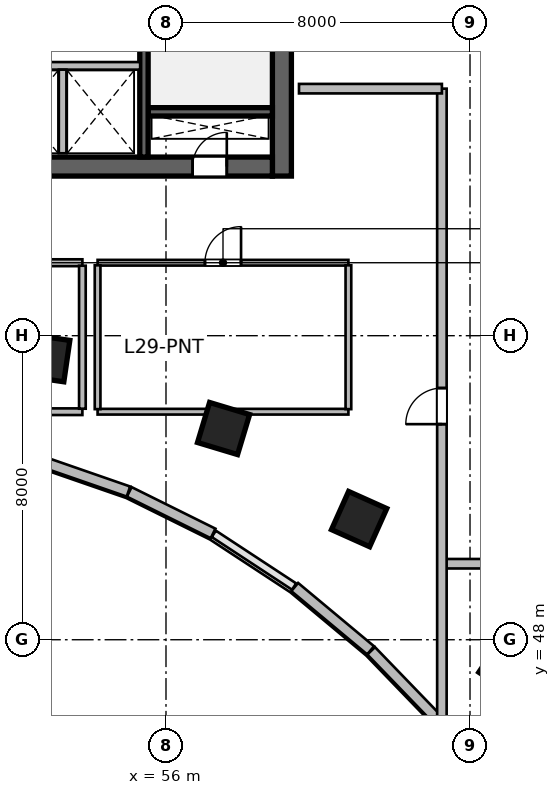
"""IFC4 building model, lengths in metres.
Left out: names, types, materials, properties, quantities, classifications, styles, units other than length and angle.
Written with IfcOpenShell. Run it as: python <this file> out.ifc"""

import sys

from ifc_helpers import new_model, si_unit, direction, frame, frame_2d, origin, origin_2d, place, context, subcontext, project, spatial, rectangle, extrude, source, transform, mapped, element, fill, save


model = new_model("IFC4")
c1 = context("Model", 3, precision=1e-05, world=origin(), true_north=direction((0.0, 1.0)))
c2 = subcontext(c1, "Body", "Model", "MODEL_VIEW")
j1 = project(units=[si_unit("LENGTHUNIT", "METRE"), si_unit("PLANEANGLEUNIT", "RADIAN")], contexts=[c1])
p1 = place(None, origin())
s1 = spatial("IfcSite", under=j1, at=p1, CompositionType="ELEMENT")
p2 = place(p1, origin())
s2 = spatial("IfcBuilding", under=s1, at=p2, CompositionType="ELEMENT")
p3 = place(p2, frame((0.0, 0.0, 123.3)))
s3 = spatial("IfcBuildingStorey", under=s2, at=p3, CompositionType="ELEMENT", Elevation=123.3)
m1 = source(origin(), c2, "Body", "SweptSolid", [
    extrude(rectangle(XDim=12.0, YDim=0.5, at=frame_2d((6.0, 0.0))), origin(), (0.0, 0.0, 1.0), 3.9),
])
p4 = place(p3, frame((59.05, 60.2, 0.0), z_axis=(0.0, 0.0, 1.0), x_axis=(0.0, 1.0, 0.0)))
e1 = element("IfcWall", 1, at=p4, inside=s3, PredefinedType="SHEAR", context=c2, shape_type="MappedRepresentation", body=[
    mapped(m1, transform((0.0, 0.0, 0.0), scale=1.0)),
])
m2 = source(origin(), c2, "Body", "SweptSolid", [
    extrude(rectangle(XDim=21.6, YDim=0.5, at=frame_2d((10.8, 0.0))), origin(), (0.0, 0.0, 1.0), 3.9),
])
p5 = place(p3, frame((37.2, 60.45, 0.0), z_axis=(0.0, 0.0, 1.0), x_axis=(1.0, 0.0, 0.0)))
e2 = element("IfcWall", 2, at=p5, inside=s3, PredefinedType="SHEAR", context=c2, shape_type="MappedRepresentation", body=[
    mapped(m2, transform((0.0, 0.0, 0.0), scale=1.0)),
])
p6 = place(p5, frame((1.1, 0.0, 0.0)))
e3 = element("IfcOpeningElement", 3, at=p6, cuts=e2, PredefinedType="OPENING", context=c2, shape_type="SweptSolid", body=[
    extrude(rectangle(XDim=1.15, YDim=2.15, at=frame_2d((0.575, 1.075))), frame((0.0, 0.26, 0.0), z_axis=(0.0, -1.0, 0.0), x_axis=(1.0, 0.0, 0.0)), (0.0, 0.0, 1.0), 0.52),
])
p7 = place(p5, frame((19.5, 0.0, 0.0)))
e4 = element("IfcOpeningElement", 4, at=p7, cuts=e2, PredefinedType="OPENING", context=c2, shape_type="SweptSolid", body=[
    extrude(rectangle(XDim=0.9, YDim=2.1, at=frame_2d((0.45, 1.05))), frame((0.0, 0.26, 0.0), z_axis=(0.0, -1.0, 0.0), x_axis=(1.0, 0.0, 0.0)), (0.0, 0.0, 1.0), 0.52),
])
p8 = place(p5, frame((12.02, 0.0, 0.0)))
e5 = element("IfcOpeningElement", 5, at=p8, cuts=e2, PredefinedType="OPENING", context=c2, shape_type="SweptSolid", body=[
    extrude(rectangle(XDim=1.6, YDim=2.15, at=frame_2d((0.8, 1.075))), frame((0.0, 0.26, 0.0), z_axis=(0.0, -1.0, 0.0), x_axis=(1.0, 0.0, 0.0)), (0.0, 0.0, 1.0), 0.52),
])
m3 = source(origin(), c2, "Body", "SweptSolid", [
    extrude(rectangle(XDim=3.27, YDim=0.22, at=frame_2d((1.635, 0.0))), origin(), (0.0, 0.0, 1.0), 3.9),
])
p9 = place(p3, frame((55.53, 61.89, 0.0), z_axis=(0.0, 0.0, 1.0), x_axis=(1.0, 0.0, 0.0)))
e6 = element("IfcWall", 6, at=p9, inside=s3, PredefinedType="SHEAR", context=c2, shape_type="MappedRepresentation", body=[
    mapped(m3, transform((0.0, 0.0, 0.0), scale=1.0)),
])
m4 = source(origin(), c2, "Body", "SweptSolid", [
    extrude(rectangle(XDim=11.0, YDim=0.22, at=frame_2d((5.5, 0.0))), origin(), (0.0, 0.0, 1.0), 3.9),
])
p10 = place(p3, frame((55.42, 60.7, 0.0), z_axis=(0.0, 0.0, 1.0), x_axis=(0.0, 1.0, 0.0)))
e7 = element("IfcWall", 7, at=p10, inside=s3, PredefinedType="SHEAR", context=c2, shape_type="MappedRepresentation", body=[
    mapped(m4, transform((0.0, 0.0, 0.0), scale=1.0)),
])
p11 = place(p10, frame((9.545, 0.0, 0.0)))
e8 = element("IfcOpeningElement", 8, at=p11, cuts=e7, PredefinedType="OPENING", context=c2, shape_type="SweptSolid", body=[
    extrude(rectangle(XDim=1.15, YDim=2.15, at=frame_2d((0.575, 1.075))), frame((0.0, 0.12, 0.0), z_axis=(0.0, -1.0, 0.0), x_axis=(1.0, 0.0, 0.0)), (0.0, 0.0, 1.0), 0.24),
])
m5 = source(origin(), c2, "Body", "SweptSolid", [
    extrude(rectangle(XDim=1.1, YDim=1.1, at=origin_2d()), origin(), (0.0, 0.0, 1.0), 3.9),
])
for number, where, z_axis, x_axis in (
    (9, (52.846, 55.411, 0.0), (0.0, 0.0, 1.0), (0.143, 0.99, 0.0)),
    (10, (57.515, 53.558, 0.0), (0.0, 0.0, 1.0), (0.289, 0.957, 0.0)),
    (11, (61.082, 51.175, 0.0), (0.0, 0.0, 1.0), (0.409, 0.912, 0.0)),
    (12, (64.996, 47.294, 0.0), (0.0, 0.0, 1.0), (0.558, 0.83, 0.0)),
):
    element("IfcColumn", number, at=place(p3, frame(where, z_axis=z_axis, x_axis=x_axis)), inside=s3, PredefinedType="COLUMN", context=c2, shape_type="MappedRepresentation", body=[
        mapped(m5, transform((0.0, 0.0, 0.0), scale=1.0)),
    ])
m6 = source(origin(), c2, "Body", "SweptSolid", [
    extrude(rectangle(XDim=2.68, YDim=0.28, at=frame_2d((1.34, 0.0))), origin(), (0.0, 0.0, 1.0), 3.65),
])
p12 = place(p3, frame((63.26, 45.78, 0.0), z_axis=(0.0, 0.0, 1.0), x_axis=(-0.694561996568, 0.719432855049, 0.0)))
e13 = element("IfcWall", 13, at=p12, inside=s3, PredefinedType="SOLIDWALL", context=c2, shape_type="MappedRepresentation", body=[
    mapped(m6, transform((0.0, 0.0, 0.0), scale=1.0)),
])
m7 = source(origin(), c2, "Body", "SweptSolid", [
    extrude(rectangle(XDim=2.601, YDim=0.28, at=frame_2d((1.3, 0.0))), origin(), (0.0, 0.0, 1.0), 3.65),
])
p13 = place(p3, frame((61.385, 47.721, 0.0), z_axis=(0.0, 0.0, 1.0), x_axis=(-0.76796730295, 0.640489048775, 0.0)))
e14 = element("IfcWall", 14, at=p13, inside=s3, PredefinedType="SOLIDWALL", context=c2, shape_type="MappedRepresentation", body=[
    mapped(m7, transform((0.0, 0.0, 0.0), scale=1.0)),
])
m8 = source(origin(), c2, "Body", "SweptSolid", [
    extrude(rectangle(XDim=2.462, YDim=0.28, at=frame_2d((1.231, 0.0))), origin(), (0.0, 0.0, 1.0), 3.65),
])
p14 = place(p3, frame((57.239, 50.797, 0.0), z_axis=(0.0, 0.0, 1.0), x_axis=(-0.8959882207, 0.444077817917, 0.0)))
e15 = element("IfcWall", 15, at=p14, inside=s3, PredefinedType="SOLIDWALL", context=c2, shape_type="MappedRepresentation", body=[
    mapped(m8, transform((0.0, 0.0, 0.0), scale=1.0)),
])
m9 = source(origin(), c2, "Body", "SweptSolid", [
    extrude(rectangle(XDim=2.411, YDim=0.28, at=frame_2d((1.205, 0.0))), origin(), (0.0, 0.0, 1.0), 3.65),
])
p15 = place(p3, frame((55.012, 51.899, 0.0), z_axis=(0.0, 0.0, 1.0), x_axis=(-0.944880068161, 0.327416640982, 0.0)))
e16 = element("IfcWall", 16, at=p15, inside=s3, PredefinedType="SOLIDWALL", context=c2, shape_type="MappedRepresentation", body=[
    mapped(m9, transform((0.0, 0.0, 0.0), scale=1.0)),
])
m10 = source(origin(), c2, "Body", "SweptSolid", [
    extrude(rectangle(XDim=4.1, YDim=0.2, at=frame_2d((2.05, 0.0))), origin(), (0.0, 0.0, 1.0), 3.65),
])
p16 = place(p3, frame((51.22, 63.1, 0.0), z_axis=(0.0, 0.0, 1.0), x_axis=(1.0, 0.0, 0.0)))
e17 = element("IfcWall", 17, at=p16, inside=s3, PredefinedType="SOLIDWALL", context=c2, shape_type="MappedRepresentation", body=[
    mapped(m10, transform((0.0, 0.0, 0.0), scale=1.0)),
])
m11 = source(origin(), c2, "Body", "SweptSolid", [
    extrude(rectangle(XDim=2.2, YDim=0.2, at=frame_2d((1.1, 0.0))), origin(), (0.0, 0.0, 1.0), 3.65),
])
p17 = place(p3, frame((53.28, 60.8, 0.0), z_axis=(0.0, 0.0, 1.0), x_axis=(0.0, 1.0, 0.0)))
e18 = element("IfcWall", 18, at=p17, inside=s3, PredefinedType="SOLIDWALL", context=c2, shape_type="MappedRepresentation", body=[
    mapped(m11, transform((0.0, 0.0, 0.0), scale=1.0)),
])
m12 = source(origin(), c2, "Body", "SweptSolid", [
    extrude(rectangle(XDim=3.248, YDim=0.175, at=frame_2d((1.624, 0.0))), origin(), (0.0, 0.0, 1.0), 3.65),
])
p18 = place(p3, frame((50.552, 54.0, 0.0), z_axis=(0.0, 0.0, 1.0), x_axis=(1.0, 0.0, 0.0)))
e19 = element("IfcWall", 19, at=p18, inside=s3, PredefinedType="PARTITIONING", context=c2, shape_type="MappedRepresentation", body=[
    mapped(m12, transform((0.0, 0.0, 0.0), scale=1.0)),
])
m13 = source(origin(), c2, "Body", "SweptSolid", [
    extrude(rectangle(XDim=3.248, YDim=0.18, at=frame_2d((1.624, 0.0))), origin(), (0.0, 0.0, 1.0), 3.65),
])
p19 = place(p3, frame((50.552, 57.92, 0.0), z_axis=(0.0, 0.0, 1.0), x_axis=(1.0, 0.0, 0.0)))
e20 = element("IfcWall", 20, at=p19, inside=s3, PredefinedType="PLUMBINGWALL", context=c2, shape_type="MappedRepresentation", body=[
    mapped(m13, transform((0.0, 0.0, 0.0), scale=1.0)),
])
p20 = place(p19, frame((1.149, 0.0, 0.0)))
e21 = element("IfcOpeningElement", 21, at=p20, cuts=e20, PredefinedType="OPENING", context=c2, shape_type="SweptSolid", body=[
    extrude(rectangle(XDim=0.95, YDim=2.12, at=frame_2d((0.475, 1.06))), frame((0.0, 0.1, 0.0), z_axis=(0.0, -1.0, 0.0), x_axis=(1.0, 0.0, 0.0)), (0.0, 0.0, 1.0), 0.2),
])
m14 = source(origin(), c2, "Body", "SweptSolid", [
    extrude(rectangle(XDim=3.763, YDim=0.175, at=frame_2d((1.881, 0.0))), origin(), (0.0, 0.0, 1.0), 3.65),
])
p21 = place(p3, frame((53.8, 54.079, 0.0), z_axis=(0.0, 0.0, 1.0), x_axis=(0.0, 1.0, 0.0)))
e22 = element("IfcWall", 22, at=p21, inside=s3, PredefinedType="PARTITIONING", context=c2, shape_type="MappedRepresentation", body=[
    mapped(m14, transform((0.0, 0.0, 0.0), scale=1.0)),
])
m15 = source(origin(), c2, "Body", "SweptSolid", [
    extrude(rectangle(XDim=6.6, YDim=0.15, at=frame_2d((3.3, 0.0))), origin(), (0.0, 0.0, 1.0), 3.095),
])
p22 = place(p3, frame((54.2, 54.0, 0.0), z_axis=(0.0, 0.0, 1.0), x_axis=(1.0, 0.0, 0.0)))
e23 = element("IfcWall", 23, at=p22, inside=s3, PredefinedType="PARTITIONING", context=c2, shape_type="MappedRepresentation", body=[
    mapped(m15, transform((0.0, 0.0, 0.0), scale=1.0)),
])
m16 = source(origin(), c2, "Body", "SweptSolid", [
    extrude(rectangle(XDim=6.6, YDim=0.15, at=frame_2d((3.3, 0.0))), origin(), (0.0, 0.0, 1.0), 3.65),
])
p23 = place(p3, frame((54.2, 57.92, 0.0), z_axis=(0.0, 0.0, 1.0), x_axis=(1.0, 0.0, 0.0)))
e24 = element("IfcWall", 24, at=p23, inside=s3, PredefinedType="PARTITIONING", context=c2, shape_type="MappedRepresentation", body=[
    mapped(m16, transform((0.0, 0.0, 0.0), scale=1.0)),
])
p24 = place(p23, frame((2.825, 0.0, 0.0)))
e25 = element("IfcOpeningElement", 25, at=p24, cuts=e24, PredefinedType="OPENING", context=c2, shape_type="SweptSolid", body=[
    extrude(rectangle(XDim=0.95, YDim=2.1, at=frame_2d((0.475, 1.05))), frame((0.0, 0.085, 0.0), z_axis=(0.0, -1.0, 0.0), x_axis=(1.0, 0.0, 0.0)), (0.0, 0.0, 1.0), 0.17),
])
m17 = source(origin(), c2, "Body", "SweptSolid", [
    extrude(rectangle(XDim=3.785, YDim=0.15, at=frame_2d((1.893, 0.0))), origin(), (0.0, 0.0, 1.0), 3.65),
])
for number, where, z_axis, x_axis in (
    (26, (54.2, 54.067, 0.0), (0.0, 0.0, 1.0), (0.0, 1.0, 0.0)),
    (27, (60.8, 54.067, 0.0), (0.0, 0.0, 1.0), (0.0, 1.0, 0.0)),
):
    element("IfcWall", number, at=place(p3, frame(where, z_axis=z_axis, x_axis=x_axis)), inside=s3, PredefinedType="PARTITIONING", context=c2, shape_type="MappedRepresentation", body=[
        mapped(m17, transform((0.0, 0.0, 0.0), scale=1.0)),
    ])
m18 = source(origin(), c2, "Body", "SweptSolid", [
    extrude(rectangle(XDim=2.5, YDim=0.25, at=frame_2d((1.25, 0.0))), origin(), (0.0, 0.0, 1.0), 3.65),
])
p25 = place(p3, frame((63.3, 50.0, 0.0), z_axis=(0.0, 0.0, 1.0), x_axis=(1.0, 0.0, 0.0)))
e28 = element("IfcWall", 28, at=p25, inside=s3, PredefinedType="PARTITIONING", context=c2, shape_type="MappedRepresentation", body=[
    mapped(m18, transform((0.0, 0.0, 0.0), scale=1.0)),
])
m19 = source(origin(), c2, "Body", "SweptSolid", [
    extrude(rectangle(XDim=16.706, YDim=0.25, at=frame_2d((8.353, 0.0))), origin(), (0.0, 0.0, 1.0), 2.942),
])
p26 = place(p3, frame((63.26, 45.794, 0.0), z_axis=(0.0, 0.0, 1.0), x_axis=(0.0, 1.0, 0.0)))
e29 = element("IfcWall", 29, at=p26, inside=s3, PredefinedType="PARTITIONING", context=c2, shape_type="MappedRepresentation", body=[
    mapped(m19, transform((0.0, 0.0, 0.0), scale=1.0)),
])
p27 = place(p26, frame((7.878, 0.0, 0.0)))
e30 = element("IfcOpeningElement", 30, at=p27, cuts=e29, PredefinedType="OPENING", context=c2, shape_type="SweptSolid", body=[
    extrude(rectangle(XDim=0.95, YDim=2.1, at=frame_2d((0.475, 1.05))), frame((0.0, 0.135, 0.0), z_axis=(0.0, -1.0, 0.0), x_axis=(1.0, 0.0, 0.0)), (0.0, 0.0, 1.0), 0.27),
])
m20 = source(origin(), c2, "Body", "SweptSolid", [
    extrude(rectangle(XDim=3.76, YDim=0.25, at=frame_2d((1.88, 0.0))), origin(), (0.0, 0.0, 1.0), 3.65),
])
p28 = place(p3, frame((59.5, 62.5, 0.0), z_axis=(0.0, 0.0, 1.0), x_axis=(1.0, 0.0, 0.0)))
e31 = element("IfcWall", 31, at=p28, inside=s3, PredefinedType="PARTITIONING", context=c2, shape_type="MappedRepresentation", body=[
    mapped(m20, transform((0.0, 0.0, 0.0), scale=1.0)),
])
m21 = source(origin(), c2, "Body", "SweptSolid", [
    extrude(rectangle(XDim=0.9, YDim=2.1, at=frame_2d((0.45, 1.05))), frame((0.0, 0.025, 0.0), z_axis=(0.0, -1.0, 0.0), x_axis=(1.0, 0.0, 0.0)), (0.0, 0.0, 1.0), 0.05),
])
p29 = place(p7, origin())
e32 = element("IfcDoor", 32, at=p29, inside=s3, OperationType="SINGLE_SWING_RIGHT", PredefinedType="DOOR", context=c2, shape_type="MappedRepresentation", body=[
    mapped(m21, transform((0.0, 0.0, 0.0), scale=1.0)),
])
fill(e4, e32)
m22 = source(origin(), c2, "Body", "SweptSolid", [
    extrude(rectangle(XDim=0.95, YDim=2.1, at=frame_2d((0.475, 1.05))), frame((0.0, 0.025, 0.0), z_axis=(0.0, -1.0, 0.0), x_axis=(1.0, 0.0, 0.0)), (0.0, 0.0, 1.0), 0.05),
])
p30 = place(p24, origin())
e33 = element("IfcDoor", 33, at=p30, inside=s3, OperationType="SINGLE_SWING_RIGHT", PredefinedType="DOOR", context=c2, shape_type="MappedRepresentation", body=[
    mapped(m22, transform((0.0, 0.0, 0.0), scale=1.0)),
])
fill(e25, e33)
p31 = place(p27, origin())
e34 = element("IfcDoor", 34, at=p31, inside=s3, OperationType="SINGLE_SWING_LEFT", PredefinedType="DOOR", context=c2, shape_type="MappedRepresentation", body=[
    mapped(m22, transform((0.0, 0.0, 0.0), scale=1.0)),
])
fill(e30, e34)
save(model, sys.argv[1])
